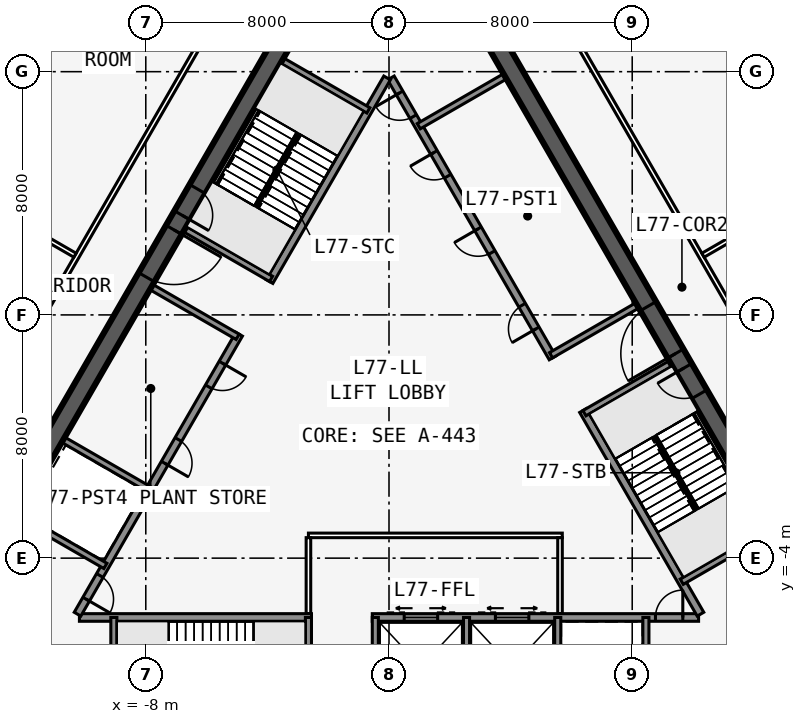
"""IFC4 building model, lengths in metres.
Left out: names, types, materials, properties, quantities, classifications, styles, units other than length and angle.
Written with IfcOpenShell. Run it as: python <this file> out.ifc"""

import sys

from ifc_helpers import new_model, si_unit, direction, frame, frame_2d, origin, place, context, subcontext, project, spatial, rectangle, extrude, element, fill, save


model = new_model("IFC4")
c1 = context("Model", 3, precision=1e-05, world=origin(), true_north=direction((0.0, 1.0)))
c2 = subcontext(c1, "Body", "Model", "MODEL_VIEW")
j1 = project(units=[si_unit("LENGTHUNIT", "METRE"), si_unit("PLANEANGLEUNIT", "RADIAN")], contexts=[c1])
p1 = place(None, origin())
s1 = spatial("IfcSite", under=j1, at=p1, CompositionType="ELEMENT")
p2 = place(p1, origin())
s2 = spatial("IfcBuilding", under=s1, at=p2, CompositionType="ELEMENT")
p3 = place(p2, frame((0.0, 0.0, 297.8)))
s3 = spatial("IfcBuildingStorey", under=s2, at=p3, CompositionType="ELEMENT", Elevation=297.8)
p4 = place(p3, frame((-10.183, -5.951, 0.0), z_axis=(0.0, 0.0, 1.0), x_axis=(1.0, 0.0, 0.0)))
e1 = element("IfcWall", 1, at=p4, inside=s3, PredefinedType="SOLIDWALL", context=c2, shape_type="SweptSolid", body=[
    extrude(rectangle(XDim=7.633, YDim=0.25, at=frame_2d((3.816, 0.0))), origin(), (0.0, 0.0, 1.0), 5.75),
])
p5 = place(p3, frame((-0.55, -5.951, 0.0), z_axis=(0.0, 0.0, 1.0), x_axis=(1.0, 0.0, 0.0)))
e2 = element("IfcWall", 2, at=p5, inside=s3, PredefinedType="SOLIDWALL", context=c2, shape_type="SweptSolid", body=[
    extrude(rectangle(XDim=10.733, YDim=0.25, at=frame_2d((5.366, 0.0))), origin(), (0.0, 0.0, 1.0), 5.75),
])
p6 = place(p5, frame((9.314, 0.0, 0.0)))
e3 = element("IfcOpeningElement", 3, at=p6, cuts=e2, PredefinedType="OPENING", context=c2, shape_type="SweptSolid", body=[
    extrude(rectangle(XDim=0.9, YDim=2.13, at=frame_2d((0.45, 1.065))), frame((0.0, 0.135, 0.0), z_axis=(0.0, -1.0, 0.0), x_axis=(1.0, 0.0, 0.0)), (0.0, 0.0, 1.0), 0.27),
])
p7 = place(p5, frame((1.05, 0.0, 0.0)))
e4 = element("IfcOpeningElement", 4, at=p7, cuts=e2, PredefinedType="OPENING", context=c2, shape_type="SweptSolid", body=[
    extrude(rectangle(XDim=1.1, YDim=2.13, at=frame_2d((0.55, 1.065))), frame((0.0, 0.135, 0.0), z_axis=(0.0, -1.0, 0.0), x_axis=(1.0, 0.0, 0.0)), (0.0, 0.0, 1.0), 0.27),
])
p8 = place(p5, frame((4.05, 0.0, 0.0)))
e5 = element("IfcOpeningElement", 5, at=p8, cuts=e2, PredefinedType="OPENING", context=c2, shape_type="SweptSolid", body=[
    extrude(rectangle(XDim=1.1, YDim=2.13, at=frame_2d((0.55, 1.065))), frame((0.0, 0.135, 0.0), z_axis=(0.0, -1.0, 0.0), x_axis=(1.0, 0.0, 0.0)), (0.0, 0.0, 1.0), 0.27),
])
p9 = place(p3, frame((-9.05, -5.951, 0.0), z_axis=(0.0, 0.0, 1.0), x_axis=(0.0, -1.0, 0.0)))
e6 = element("IfcWall", 6, at=p9, inside=s3, PredefinedType="SOLIDWALL", context=c2, shape_type="SweptSolid", body=[
    extrude(rectangle(XDim=3.275, YDim=0.2, at=frame_2d((1.637, 0.0))), origin(), (0.0, 0.0, 1.0), 5.75),
])
p10 = place(p3, frame((-2.65, -5.951, 0.0), z_axis=(0.0, 0.0, 1.0), x_axis=(0.0, -1.0, 0.0)))
e7 = element("IfcWall", 7, at=p10, inside=s3, PredefinedType="SOLIDWALL", context=c2, shape_type="SweptSolid", body=[
    extrude(rectangle(XDim=3.275, YDim=0.2, at=frame_2d((1.637, 0.0))), origin(), (0.0, 0.0, 1.0), 5.75),
])
p11 = place(p10, frame((1.675, 0.0, 0.0)))
e8 = element("IfcOpeningElement", 8, at=p11, cuts=e7, PredefinedType="OPENING", context=c2, shape_type="SweptSolid", body=[
    extrude(rectangle(XDim=1.0, YDim=2.13, at=frame_2d((0.5, 1.065))), frame((0.0, 0.11, 0.0), z_axis=(0.0, -1.0, 0.0), x_axis=(1.0, 0.0, 0.0)), (0.0, 0.0, 1.0), 0.22),
])
for number, where, z_axis, x_axis in (
    (9, (-0.45, -5.951, 0.0), (0.0, 0.0, 1.0), (0.0, -1.0, 0.0)),
    (10, (2.55, -5.951, 0.0), (0.0, 0.0, 1.0), (0.0, -1.0, 0.0)),
    (11, (5.55, -5.951, 0.0), (0.0, 0.0, 1.0), (0.0, -1.0, 0.0)),
    (12, (8.45, -5.951, 0.0), (0.0, 0.0, 1.0), (0.0, -1.0, 0.0)),
):
    element("IfcWall", number, at=place(p3, frame(where, z_axis=z_axis, x_axis=x_axis)), inside=s3, PredefinedType="SOLIDWALL", context=c2, shape_type="SweptSolid", body=[
        extrude(rectangle(XDim=3.275, YDim=0.2, at=frame_2d((1.637, 0.0))), origin(), (0.0, 0.0, 1.0), 5.75),
    ])
p12 = place(p3, frame((16.5, -9.526, 0.0), z_axis=(0.0, 0.0, 1.0), x_axis=(-0.499999749417, 0.866025548458, 0.0)))
e13 = element("IfcWall", 13, at=p12, inside=s3, PredefinedType="SHEAR", context=c2, shape_type="SweptSolid", body=[
    extrude(rectangle(XDim=33.0, YDim=0.6, at=frame_2d((16.5, 0.0))), origin(), (0.0, 0.0, 1.0), 6.0),
])
p13 = place(p12, frame((14.15, 0.0, 0.0)))
e14 = element("IfcOpeningElement", 14, at=p13, cuts=e13, PredefinedType="OPENING", context=c2, shape_type="SweptSolid", body=[
    extrude(rectangle(XDim=1.8, YDim=2.13, at=frame_2d((0.9, 1.065))), frame((0.0, 0.31, 0.0), z_axis=(0.0, -1.0, 0.0), x_axis=(1.0, 0.0, 0.0)), (0.0, 0.0, 1.0), 0.62),
])
p14 = place(p12, frame((12.6, 0.0, 0.0)))
e15 = element("IfcOpeningElement", 15, at=p14, cuts=e13, PredefinedType="OPENING", context=c2, shape_type="SweptSolid", body=[
    extrude(rectangle(XDim=1.0, YDim=2.13, at=frame_2d((0.5, 1.065))), frame((0.0, 0.31, 0.0), z_axis=(0.0, -1.0, 0.0), x_axis=(1.0, 0.0, 0.0)), (0.0, 0.0, 1.0), 0.62),
])
p15 = place(p3, frame((10.245, -5.843, 0.0), z_axis=(0.0, 0.0, 1.0), x_axis=(-0.499993009313, 0.866029439822, 0.0)))
e16 = element("IfcWall", 16, at=p15, inside=s3, PredefinedType="SOLIDWALL", context=c2, shape_type="SweptSolid", body=[
    extrude(rectangle(XDim=7.733, YDim=0.25, at=frame_2d((3.866, 0.0))), origin(), (0.0, 0.0, 1.0), 5.75),
])
p16 = place(p3, frame((5.379, 2.586, 0.0), z_axis=(0.0, 0.0, 1.0), x_axis=(-0.500001375892, 0.866024609411, 0.0)))
e17 = element("IfcWall", 17, at=p16, inside=s3, PredefinedType="SOLIDWALL", context=c2, shape_type="SweptSolid", body=[
    extrude(rectangle(XDim=10.633, YDim=0.25, at=frame_2d((5.316, 0.0))), origin(), (0.0, 0.0, 1.0), 5.75),
])
p17 = place(p16, frame((9.164, 0.0, 0.0)))
e18 = element("IfcOpeningElement", 18, at=p17, cuts=e17, PredefinedType="OPENING", context=c2, shape_type="SweptSolid", body=[
    extrude(rectangle(XDim=0.9, YDim=2.13, at=frame_2d((0.45, 1.065))), frame((0.0, 0.135, 0.0), z_axis=(0.0, -1.0, 0.0), x_axis=(1.0, 0.0, 0.0)), (0.0, 0.0, 1.0), 0.27),
])
p18 = place(p16, frame((1.1, 0.0, 0.0)))
e19 = element("IfcOpeningElement", 19, at=p18, cuts=e17, PredefinedType="OPENING", context=c2, shape_type="SweptSolid", body=[
    extrude(rectangle(XDim=0.9, YDim=2.13, at=frame_2d((0.45, 1.065))), frame((0.0, 0.135, 0.0), z_axis=(0.0, -1.0, 0.0), x_axis=(1.0, 0.0, 0.0)), (0.0, 0.0, 1.0), 0.27),
])
p19 = place(p16, frame((4.0, 0.0, 0.0)))
e20 = element("IfcOpeningElement", 20, at=p19, cuts=e17, PredefinedType="OPENING", context=c2, shape_type="SweptSolid", body=[
    extrude(rectangle(XDim=0.9, YDim=2.13, at=frame_2d((0.45, 1.065))), frame((0.0, 0.135, 0.0), z_axis=(0.0, -1.0, 0.0), x_axis=(1.0, 0.0, 0.0)), (0.0, 0.0, 1.0), 0.27),
])
p20 = place(p16, frame((6.9, 0.0, 0.0)))
e21 = element("IfcOpeningElement", 21, at=p20, cuts=e17, PredefinedType="OPENING", context=c2, shape_type="SweptSolid", body=[
    extrude(rectangle(XDim=0.9, YDim=2.13, at=frame_2d((0.45, 1.065))), frame((0.0, 0.135, 0.0), z_axis=(0.0, -1.0, 0.0), x_axis=(1.0, 0.0, 0.0)), (0.0, 0.0, 1.0), 0.27),
])
p21 = place(p3, frame((9.629, -4.775, 0.0), z_axis=(0.0, 0.0, 1.0), x_axis=(0.865995643347, 0.500051543047, 0.0)))
e22 = element("IfcWall", 22, at=p21, inside=s3, PredefinedType="SOLIDWALL", context=c2, shape_type="SweptSolid", body=[
    extrude(rectangle(XDim=3.275, YDim=0.2, at=frame_2d((1.638, 0.0))), origin(), (0.0, 0.0, 1.0), 5.75),
])
for number, where, z_axis, x_axis in (
    (23, (6.429, 0.767, 0.0), (0.0, 0.0, 1.0), (0.866, 0.5, 0.0)),
    (24, (5.329, 2.673, 0.0), (0.0, 0.0, 1.0), (0.866, 0.5, 0.0)),
    (25, (0.979, 10.207, 0.0), (0.0, 0.0, 1.0), (0.866, 0.5, 0.0)),
):
    element("IfcWall", number, at=place(p3, frame(where, z_axis=z_axis, x_axis=x_axis)), inside=s3, PredefinedType="SOLIDWALL", context=c2, shape_type="SweptSolid", body=[
        extrude(rectangle(XDim=3.275, YDim=0.2, at=frame_2d((1.637, 0.0))), origin(), (0.0, 0.0, 1.0), 5.75),
    ])
p22 = place(p3, frame((0.0, 19.052, 0.0), z_axis=(0.0, 0.0, 1.0), x_axis=(-0.499999749417, -0.866025548458, 0.0)))
e26 = element("IfcWall", 26, at=p22, inside=s3, PredefinedType="SHEAR", context=c2, shape_type="SweptSolid", body=[
    extrude(rectangle(XDim=33.0, YDim=0.6, at=frame_2d((16.5, 0.0))), origin(), (0.0, 0.0, 1.0), 6.0),
])
p23 = place(p22, frame((14.15, 0.0, 0.0)))
e27 = element("IfcOpeningElement", 27, at=p23, cuts=e26, PredefinedType="OPENING", context=c2, shape_type="SweptSolid", body=[
    extrude(rectangle(XDim=1.8, YDim=2.13, at=frame_2d((0.9, 1.065))), frame((0.0, 0.31, 0.0), z_axis=(0.0, -1.0, 0.0), x_axis=(1.0, 0.0, 0.0)), (0.0, 0.0, 1.0), 0.62),
])
p24 = place(p22, frame((12.6, 0.0, 0.0)))
e28 = element("IfcOpeningElement", 28, at=p24, cuts=e26, PredefinedType="OPENING", context=c2, shape_type="SweptSolid", body=[
    extrude(rectangle(XDim=1.0, YDim=2.13, at=frame_2d((0.5, 1.065))), frame((0.0, 0.31, 0.0), z_axis=(0.0, -1.0, 0.0), x_axis=(1.0, 0.0, 0.0)), (0.0, 0.0, 1.0), 0.62),
])
p25 = place(p3, frame((-0.062, 11.794, 0.0), z_axis=(0.0, 0.0, 1.0), x_axis=(-0.500006680225, -0.86602154692, 0.0)))
e29 = element("IfcWall", 29, at=p25, inside=s3, PredefinedType="SOLIDWALL", context=c2, shape_type="SweptSolid", body=[
    extrude(rectangle(XDim=7.733, YDim=0.25, at=frame_2d((3.866, 0.0))), origin(), (0.0, 0.0, 1.0), 5.75),
])
p26 = place(p3, frame((-4.929, 3.365, 0.0), z_axis=(0.0, 0.0, 1.0), x_axis=(-0.499991433582, -0.866030349552, 0.0)))
e30 = element("IfcWall", 30, at=p26, inside=s3, PredefinedType="SOLIDWALL", context=c2, shape_type="SweptSolid", body=[
    extrude(rectangle(XDim=10.633, YDim=0.25, at=frame_2d((5.316, 0.0))), origin(), (0.0, 0.0, 1.0), 5.75),
])
p27 = place(p26, frame((9.164, 0.0, 0.0)))
e31 = element("IfcOpeningElement", 31, at=p27, cuts=e30, PredefinedType="OPENING", context=c2, shape_type="SweptSolid", body=[
    extrude(rectangle(XDim=0.9, YDim=2.13, at=frame_2d((0.45, 1.065))), frame((0.0, 0.135, 0.0), z_axis=(0.0, -1.0, 0.0), x_axis=(1.0, 0.0, 0.0)), (0.0, 0.0, 1.0), 0.27),
])
p28 = place(p26, frame((1.1, 0.0, 0.0)))
e32 = element("IfcOpeningElement", 32, at=p28, cuts=e30, PredefinedType="OPENING", context=c2, shape_type="SweptSolid", body=[
    extrude(rectangle(XDim=0.9, YDim=2.13, at=frame_2d((0.45, 1.065))), frame((0.0, 0.135, 0.0), z_axis=(0.0, -1.0, 0.0), x_axis=(1.0, 0.0, 0.0)), (0.0, 0.0, 1.0), 0.27),
])
p29 = place(p26, frame((4.0, 0.0, 0.0)))
e33 = element("IfcOpeningElement", 33, at=p29, cuts=e30, PredefinedType="OPENING", context=c2, shape_type="SweptSolid", body=[
    extrude(rectangle(XDim=0.9, YDim=2.13, at=frame_2d((0.45, 1.065))), frame((0.0, 0.135, 0.0), z_axis=(0.0, -1.0, 0.0), x_axis=(1.0, 0.0, 0.0)), (0.0, 0.0, 1.0), 0.27),
])
for number, where, z_axis, x_axis in (
    (34, (-0.679, 10.727, 0.0), (0.0, 0.0, 1.0), (-0.866, 0.5, 0.0)),
    (35, (-3.879, 5.184, 0.0), (0.0, 0.0, 1.0), (-0.866, 0.5, 0.0)),
    (36, (-4.979, 3.279, 0.0), (0.0, 0.0, 1.0), (-0.866, 0.5, 0.0)),
    (37, (-7.879, -1.744, 0.0), (0.0, 0.0, 1.0), (-0.866, 0.5, 0.0)),
    (38, (-9.329, -4.256, 0.0), (0.0, 0.0, 1.0), (-0.866, 0.5, 0.0)),
):
    element("IfcWall", number, at=place(p3, frame(where, z_axis=z_axis, x_axis=x_axis)), inside=s3, PredefinedType="SOLIDWALL", context=c2, shape_type="SweptSolid", body=[
        extrude(rectangle(XDim=3.275, YDim=0.2, at=frame_2d((1.637, 0.0))), origin(), (0.0, 0.0, 1.0), 5.75),
    ])
p30 = place(p3, frame((20.177, -11.245, 0.0), z_axis=(0.0, 0.0, 1.0), x_axis=(-0.499998875317, 0.866026053119, 0.0)))
e39 = element("IfcWall", 39, at=p30, inside=s3, PredefinedType="PARTITIONING", context=c2, shape_type="SweptSolid", body=[
    extrude(rectangle(XDim=39.654, YDim=0.15, at=frame_2d((19.827, 0.0))), origin(), (0.0, 0.0, 1.0), 5.75),
])
p31 = place(p30, frame((9.563, 0.0, 0.0)))
e40 = element("IfcOpeningElement", 40, at=p31, cuts=e39, PredefinedType="OPENING", context=c2, shape_type="SweptSolid", body=[
    extrude(rectangle(XDim=1.0, YDim=2.13, at=frame_2d((0.5, 1.065))), frame((0.0, 0.085, 0.0), z_axis=(0.0, -1.0, 0.0), x_axis=(1.0, 0.0, 0.0)), (0.0, 0.0, 1.0), 0.17),
])
p32 = place(p30, frame((29.091, 0.0, 0.0)))
e41 = element("IfcOpeningElement", 41, at=p32, cuts=e39, PredefinedType="OPENING", context=c2, shape_type="SweptSolid", body=[
    extrude(rectangle(XDim=1.0, YDim=2.13, at=frame_2d((0.5, 1.065))), frame((0.0, 0.085, 0.0), z_axis=(0.0, -1.0, 0.0), x_axis=(1.0, 0.0, 0.0)), (0.0, 0.0, 1.0), 0.17),
])
p33 = place(p3, frame((10.329, 5.963, 0.0), z_axis=(0.0, 0.0, 1.0), x_axis=(0.86601224135, 0.500022797313, 0.0)))
e42 = element("IfcWall", 42, at=p33, inside=s3, PredefinedType="PARTITIONING", context=c2, shape_type="SweptSolid", body=[
    extrude(rectangle(XDim=5.699, YDim=0.15, at=frame_2d((2.85, 0.0))), origin(), (0.0, 0.0, 1.0), 4.708),
])
p34 = place(p3, frame((-0.35, 23.096, 0.0), z_axis=(0.0, 0.0, 1.0), x_axis=(-0.499998875317, -0.866026053119, 0.0)))
e43 = element("IfcWall", 43, at=p34, inside=s3, PredefinedType="PARTITIONING", context=c2, shape_type="SweptSolid", body=[
    extrude(rectangle(XDim=39.654, YDim=0.15, at=frame_2d((19.827, 0.0))), origin(), (0.0, 0.0, 1.0), 5.75),
])
p35 = place(p34, frame((9.563, 0.0, 0.0)))
e44 = element("IfcOpeningElement", 44, at=p35, cuts=e43, PredefinedType="OPENING", context=c2, shape_type="SweptSolid", body=[
    extrude(rectangle(XDim=1.0, YDim=2.13, at=frame_2d((0.5, 1.065))), frame((0.0, 0.085, 0.0), z_axis=(0.0, -1.0, 0.0), x_axis=(1.0, 0.0, 0.0)), (0.0, 0.0, 1.0), 0.17),
])
p36 = place(p34, frame((29.091, 0.0, 0.0)))
e45 = element("IfcOpeningElement", 45, at=p36, cuts=e43, PredefinedType="OPENING", context=c2, shape_type="SweptSolid", body=[
    extrude(rectangle(XDim=1.0, YDim=2.13, at=frame_2d((0.5, 1.065))), frame((0.0, 0.085, 0.0), z_axis=(0.0, -1.0, 0.0), x_axis=(1.0, 0.0, 0.0)), (0.0, 0.0, 1.0), 0.17),
])
p37 = place(p3, frame((-10.329, 5.963, 0.0), z_axis=(0.0, 0.0, 1.0), x_axis=(-0.86601224135, 0.500022797313, 0.0)))
e46 = element("IfcWall", 46, at=p37, inside=s3, PredefinedType="PARTITIONING", context=c2, shape_type="SweptSolid", body=[
    extrude(rectangle(XDim=5.699, YDim=0.15, at=frame_2d((2.85, 0.0))), origin(), (0.0, 0.0, 1.0), 4.708),
])
p38 = place(p3, frame((-2.65, -3.251, 0.0), z_axis=(0.0, 0.0, 1.0), x_axis=(1.0, 0.0, 0.0)))
e47 = element("IfcWall", 47, at=p38, inside=s3, PredefinedType="PARTITIONING", context=c2, shape_type="SweptSolid", body=[
    extrude(rectangle(XDim=8.35, YDim=0.15, at=frame_2d((4.175, 0.0))), origin(), (0.0, 0.0, 1.0), 5.75),
])
for number, where, z_axis, x_axis in (
    (48, (-2.65, -5.826, 0.0), (0.0, 0.0, 1.0), (0.0, 1.0, 0.0)),
    (49, (5.625, -5.826, 0.0), (0.0, 0.0, 1.0), (0.0, 1.0, 0.0)),
):
    element("IfcWall", number, at=place(p3, frame(where, z_axis=z_axis, x_axis=x_axis)), inside=s3, PredefinedType="PARTITIONING", context=c2, shape_type="SweptSolid", body=[
        extrude(rectangle(XDim=2.5, YDim=0.15, at=frame_2d((1.25, 0.0))), origin(), (0.0, 0.0, 1.0), 5.75),
    ])
for number, where, z_axis, x_axis in (
    (50, (10.135, -2.401, 0.0), (0.0, 0.0, 1.0), (-0.5, 0.866, 0.0)),
    (51, (-2.988, 9.978, 0.0), (0.0, 0.0, 1.0), (-0.5, -0.866, 0.0)),
):
    element("IfcWall", number, at=place(p3, frame(where, z_axis=z_axis, x_axis=x_axis)), inside=s3, PredefinedType="SOLIDWALL", context=c2, shape_type="SweptSolid", body=[
        extrude(rectangle(XDim=2.794, YDim=0.1, at=frame_2d((1.397, 0.0))), origin(), (0.0, 0.0, 1.0), 6.0),
    ])
p39 = place(p13, origin())
e52 = element("IfcDoor", 52, at=p39, inside=s3, OperationType="DOUBLE_DOOR_SINGLE_SWING", PredefinedType="DOOR", context=c2, shape_type="SweptSolid", body=[
    extrude(rectangle(XDim=1.8, YDim=2.13, at=frame_2d((0.9, 1.065))), frame((0.0, 0.025, 0.0), z_axis=(0.0, -1.0, 0.0), x_axis=(1.0, 0.0, 0.0)), (0.0, 0.0, 1.0), 0.05),
])
fill(e14, e52)
p40 = place(p14, origin())
e53 = element("IfcDoor", 53, at=p40, inside=s3, OperationType="SINGLE_SWING_RIGHT", PredefinedType="DOOR", context=c2, shape_type="SweptSolid", body=[
    extrude(rectangle(XDim=1.0, YDim=2.13, at=frame_2d((0.5, 1.065))), frame((0.0, 0.025, 0.0), z_axis=(0.0, -1.0, 0.0), x_axis=(1.0, 0.0, 0.0)), (0.0, 0.0, 1.0), 0.05),
])
fill(e15, e53)
p41 = place(p23, origin())
e54 = element("IfcDoor", 54, at=p41, inside=s3, OperationType="DOUBLE_DOOR_SINGLE_SWING", PredefinedType="DOOR", context=c2, shape_type="SweptSolid", body=[
    extrude(rectangle(XDim=1.8, YDim=2.13, at=frame_2d((0.9, 1.065))), frame((0.0, 0.025, 0.0), z_axis=(0.0, -1.0, 0.0), x_axis=(1.0, 0.0, 0.0)), (0.0, 0.0, 1.0), 0.05),
])
fill(e27, e54)
p42 = place(p24, origin())
e55 = element("IfcDoor", 55, at=p42, inside=s3, OperationType="SINGLE_SWING_RIGHT", PredefinedType="DOOR", context=c2, shape_type="SweptSolid", body=[
    extrude(rectangle(XDim=1.0, YDim=2.13, at=frame_2d((0.5, 1.065))), frame((0.0, 0.025, 0.0), z_axis=(0.0, -1.0, 0.0), x_axis=(1.0, 0.0, 0.0)), (0.0, 0.0, 1.0), 0.05),
])
fill(e28, e55)
p43 = place(p6, origin())
e56 = element("IfcDoor", 56, at=p43, inside=s3, OperationType="SINGLE_SWING_RIGHT", PredefinedType="DOOR", context=c2, shape_type="SweptSolid", body=[
    extrude(rectangle(XDim=0.9, YDim=2.13, at=frame_2d((0.45, 1.065))), frame((0.0, 0.025, 0.0), z_axis=(0.0, -1.0, 0.0), x_axis=(1.0, 0.0, 0.0)), (0.0, 0.0, 1.0), 0.05),
])
fill(e3, e56)
p44 = place(p17, origin())
e57 = element("IfcDoor", 57, at=p44, inside=s3, OperationType="SINGLE_SWING_RIGHT", PredefinedType="DOOR", context=c2, shape_type="SweptSolid", body=[
    extrude(rectangle(XDim=0.9, YDim=2.13, at=frame_2d((0.45, 1.065))), frame((0.0, 0.025, 0.0), z_axis=(0.0, -1.0, 0.0), x_axis=(1.0, 0.0, 0.0)), (0.0, 0.0, 1.0), 0.05),
])
fill(e18, e57)
p45 = place(p27, origin())
e58 = element("IfcDoor", 58, at=p45, inside=s3, OperationType="SINGLE_SWING_RIGHT", PredefinedType="DOOR", context=c2, shape_type="SweptSolid", body=[
    extrude(rectangle(XDim=0.9, YDim=2.13, at=frame_2d((0.45, 1.065))), frame((0.0, 0.025, 0.0), z_axis=(0.0, -1.0, 0.0), x_axis=(1.0, 0.0, 0.0)), (0.0, 0.0, 1.0), 0.05),
])
fill(e31, e58)
p46 = place(p18, origin())
e59 = element("IfcDoor", 59, at=p46, inside=s3, OperationType="SINGLE_SWING_LEFT", PredefinedType="DOOR", context=c2, shape_type="SweptSolid", body=[
    extrude(rectangle(XDim=0.9, YDim=2.13, at=frame_2d((0.45, 1.065))), frame((0.0, 0.025, 0.0), z_axis=(0.0, -1.0, 0.0), x_axis=(1.0, 0.0, 0.0)), (0.0, 0.0, 1.0), 0.05),
])
fill(e19, e59)
p47 = place(p19, origin())
e60 = element("IfcDoor", 60, at=p47, inside=s3, OperationType="SINGLE_SWING_RIGHT", PredefinedType="DOOR", context=c2, shape_type="SweptSolid", body=[
    extrude(rectangle(XDim=0.9, YDim=2.13, at=frame_2d((0.45, 1.065))), frame((0.0, 0.025, 0.0), z_axis=(0.0, -1.0, 0.0), x_axis=(1.0, 0.0, 0.0)), (0.0, 0.0, 1.0), 0.05),
])
fill(e20, e60)
p48 = place(p20, origin())
e61 = element("IfcDoor", 61, at=p48, inside=s3, OperationType="SINGLE_SWING_RIGHT", PredefinedType="DOOR", context=c2, shape_type="SweptSolid", body=[
    extrude(rectangle(XDim=0.9, YDim=2.13, at=frame_2d((0.45, 1.065))), frame((0.0, 0.025, 0.0), z_axis=(0.0, -1.0, 0.0), x_axis=(1.0, 0.0, 0.0)), (0.0, 0.0, 1.0), 0.05),
])
fill(e21, e61)
p49 = place(p28, origin())
e62 = element("IfcDoor", 62, at=p49, inside=s3, OperationType="SINGLE_SWING_LEFT", PredefinedType="DOOR", context=c2, shape_type="SweptSolid", body=[
    extrude(rectangle(XDim=0.9, YDim=2.13, at=frame_2d((0.45, 1.065))), frame((0.0, 0.025, 0.0), z_axis=(0.0, -1.0, 0.0), x_axis=(1.0, 0.0, 0.0)), (0.0, 0.0, 1.0), 0.05),
])
fill(e32, e62)
p50 = place(p29, origin())
e63 = element("IfcDoor", 63, at=p50, inside=s3, OperationType="SINGLE_SWING_RIGHT", PredefinedType="DOOR", context=c2, shape_type="SweptSolid", body=[
    extrude(rectangle(XDim=0.9, YDim=2.13, at=frame_2d((0.45, 1.065))), frame((0.0, 0.025, 0.0), z_axis=(0.0, -1.0, 0.0), x_axis=(1.0, 0.0, 0.0)), (0.0, 0.0, 1.0), 0.05),
])
fill(e33, e63)
p51 = place(p7, origin())
e64 = element("IfcDoor", 64, at=p51, inside=s3, OperationType="DOUBLE_DOOR_SLIDING", PredefinedType="USERDEFINED", context=c2, shape_type="SweptSolid", body=[
    extrude(rectangle(XDim=1.1, YDim=2.13, at=frame_2d((0.55, 1.065))), frame((0.0, 0.025, 0.0), z_axis=(0.0, -1.0, 0.0), x_axis=(1.0, 0.0, 0.0)), (0.0, 0.0, 1.0), 0.05),
])
fill(e4, e64)
p52 = place(p8, origin())
e65 = element("IfcDoor", 65, at=p52, inside=s3, OperationType="DOUBLE_DOOR_SLIDING", PredefinedType="USERDEFINED", context=c2, shape_type="SweptSolid", body=[
    extrude(rectangle(XDim=1.1, YDim=2.13, at=frame_2d((0.55, 1.065))), frame((0.0, 0.025, 0.0), z_axis=(0.0, -1.0, 0.0), x_axis=(1.0, 0.0, 0.0)), (0.0, 0.0, 1.0), 0.05),
])
fill(e5, e65)
save(model, sys.argv[1])
